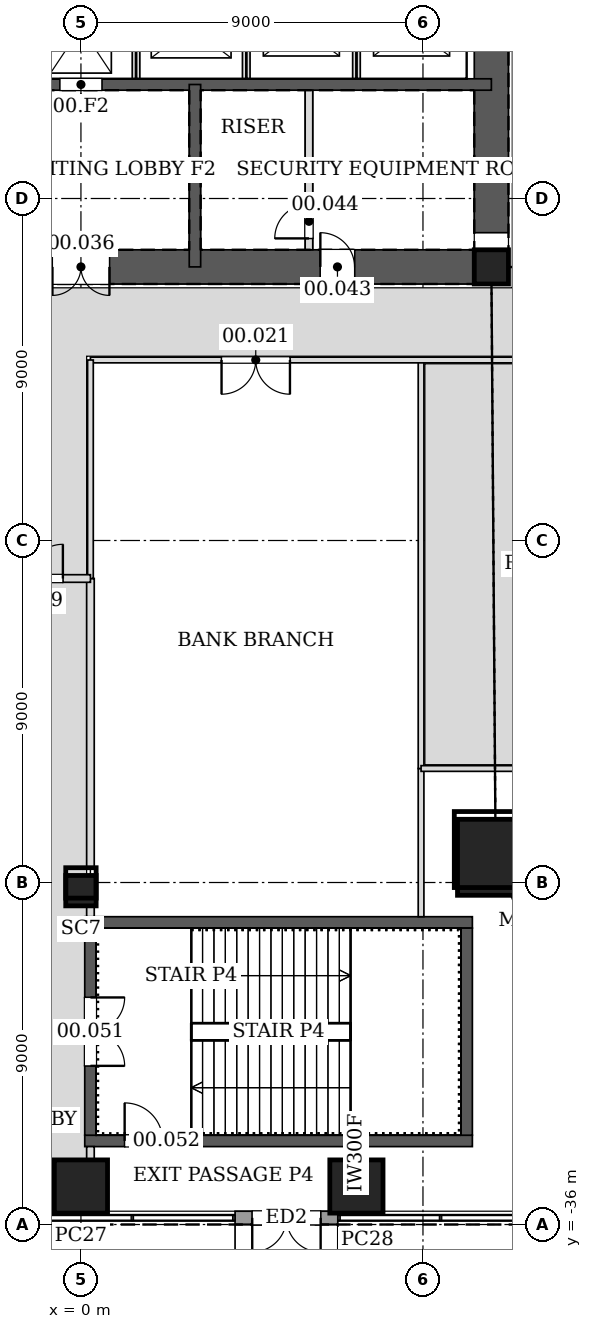
"""IFC4 building model, lengths in metres.
Left out: names, types, materials, properties, quantities, classifications, styles, units other than length and angle.
Written with IfcOpenShell. Run it as: python <this file> out.ifc"""

import sys

from ifc_helpers import new_model, si_unit, direction, frame, frame_2d, origin, origin_2d, place, context, subcontext, project, spatial, rectangle, hollow_rectangle, extrude, element, fill, save


model = new_model("IFC4")
c1 = context("Model", 3, precision=1e-05, world=origin(), true_north=direction((0.0, 1.0)))
c2 = subcontext(c1, "Body", "Model", "MODEL_VIEW")
j1 = project(units=[si_unit("LENGTHUNIT", "METRE"), si_unit("PLANEANGLEUNIT", "RADIAN")], contexts=[c1])
p1 = place(None, origin())
s1 = spatial("IfcSite", under=j1, at=p1, CompositionType="ELEMENT")
p2 = place(p1, origin())
s2 = spatial("IfcBuilding", under=s1, at=p2, CompositionType="ELEMENT")
p3 = place(p2, origin())
s3 = spatial("IfcBuildingStorey", under=s2, at=p3, CompositionType="ELEMENT", Elevation=0.0)
p4 = place(p3, frame((10.909, -26.336, 0.0), z_axis=(-0.011726897842, 0.028266568786, 0.999531630793), x_axis=(-0.923665637433, -0.383199413132, 0.0)))
e1 = element("IfcColumn", 1, at=p4, inside=s3, PredefinedType="COLUMN", context=c2, shape_type="SweptSolid", body=[
    extrude(hollow_rectangle(XDim=2.0, YDim=2.0, WallThickness=0.09, at=origin_2d()), origin(), (0.0, 0.0, 1.0), 7.203),
])
p5 = place(p3, frame((0.0, -27.215, 0.0), z_axis=(0.0, 0.028268512598, 0.999600365744), x_axis=(-1.0, 0.0, 0.0)))
e2 = element("IfcColumn", 2, at=p5, inside=s3, PredefinedType="COLUMN", context=c2, shape_type="SweptSolid", body=[
    extrude(hollow_rectangle(XDim=0.8, YDim=0.8, WallThickness=0.05, at=origin_2d()), origin(), (0.0, 0.0, 1.0), 7.203),
])
for number, where, z_axis, x_axis in (
    (3, (0.0, -35.0, 0.0), (0.0, 0.0, 1.0), (1.0, 0.0, 0.0)),
    (4, (7.249, -35.0, 0.0), (0.0, 0.0, 1.0), (1.0, 0.0, 0.0)),
):
    element("IfcColumn", number, at=place(p3, frame(where, z_axis=z_axis, x_axis=x_axis)), inside=s3, PredefinedType="COLUMN", context=c2, shape_type="SweptSolid", body=[
        extrude(rectangle(XDim=1.4, YDim=1.4, at=origin_2d()), origin(), (0.0, 0.0, 1.0), 7.2),
    ])
p6 = place(p3, frame((10.8, -10.8, 0.0), z_axis=(0.0, 0.0, 1.0), x_axis=(1.0, 0.0, 0.0)))
e5 = element("IfcColumn", 5, at=p6, inside=s3, PredefinedType="COLUMN", context=c2, shape_type="SweptSolid", body=[
    extrude(hollow_rectangle(XDim=0.9, YDim=0.9, WallThickness=0.06, at=origin_2d()), origin(), (0.0, 0.0, 1.0), 7.2),
])
p7 = place(p3, frame((-10.8, -10.8, 0.0), z_axis=(0.0, 0.0, 1.0), x_axis=(1.0, 0.0, 0.0)))
e6 = element("IfcWall", 6, at=p7, inside=s3, PredefinedType="SOLIDWALL", context=c2, shape_type="SweptSolid", body=[
    extrude(rectangle(XDim=21.6, YDim=0.9, at=frame_2d((10.8, 0.0))), origin(), (0.0, 0.0, 1.0), 7.2),
])
p8 = place(p7, frame((10.05, 0.0, 0.0)))
e7 = element("IfcOpeningElement", 7, at=p8, cuts=e6, PredefinedType="OPENING", context=c2, shape_type="SweptSolid", body=[
    extrude(rectangle(XDim=1.5, YDim=2.1, at=frame_2d((0.75, 1.05))), frame((0.0, 0.46, 0.0), z_axis=(0.0, -1.0, 0.0), x_axis=(1.0, 0.0, 0.0)), (0.0, 0.0, 1.0), 0.92),
])
p9 = place(p7, frame((6.3, 0.0, 0.0)))
e8 = element("IfcOpeningElement", 8, at=p9, cuts=e6, PredefinedType="OPENING", context=c2, shape_type="SweptSolid", body=[
    extrude(rectangle(XDim=1.2, YDim=2.1, at=frame_2d((0.6, 1.05))), frame((0.0, 0.46, 0.0), z_axis=(0.0, -1.0, 0.0), x_axis=(1.0, 0.0, 0.0)), (0.0, 0.0, 1.0), 0.92),
])
p10 = place(p7, frame((17.1, 0.0, 0.0)))
e9 = element("IfcOpeningElement", 9, at=p10, cuts=e6, PredefinedType="OPENING", context=c2, shape_type="SweptSolid", body=[
    extrude(rectangle(XDim=0.9, YDim=2.1, at=frame_2d((0.45, 1.05))), frame((0.0, 0.46, 0.0), z_axis=(0.0, -1.0, 0.0), x_axis=(1.0, 0.0, 0.0)), (0.0, 0.0, 1.0), 0.92),
])
p11 = place(p3, frame((10.8, -10.8, 0.0), z_axis=(0.0, 0.0, 1.0), x_axis=(0.0, 1.0, 0.0)))
e10 = element("IfcWall", 10, at=p11, inside=s3, PredefinedType="SOLIDWALL", context=c2, shape_type="SweptSolid", body=[
    extrude(rectangle(XDim=21.6, YDim=0.9, at=frame_2d((10.8, 0.0))), origin(), (0.0, 0.0, 1.0), 7.2),
])
p12 = place(p11, frame((11.7, 0.0, 0.0)))
e11 = element("IfcOpeningElement", 11, at=p12, cuts=e10, PredefinedType="OPENING", context=c2, shape_type="SweptSolid", body=[
    extrude(rectangle(XDim=1.2, YDim=2.1, at=frame_2d((0.6, 1.05))), frame((0.0, 0.46, 0.0), z_axis=(0.0, -1.0, 0.0), x_axis=(1.0, 0.0, 0.0)), (0.0, 0.0, 1.0), 0.92),
])
p13 = place(p11, frame((8.7, 0.0, 0.0)))
e12 = element("IfcOpeningElement", 12, at=p13, cuts=e10, PredefinedType="OPENING", context=c2, shape_type="SweptSolid", body=[
    extrude(rectangle(XDim=1.2, YDim=2.1, at=frame_2d((0.6, 1.05))), frame((0.0, 0.46, 0.0), z_axis=(0.0, -1.0, 0.0), x_axis=(1.0, 0.0, 0.0)), (0.0, 0.0, 1.0), 0.92),
])
p14 = place(p3, frame((-10.8, -6.0, 0.0), z_axis=(0.0, 0.0, 1.0), x_axis=(1.0, 0.0, 0.0)))
e13 = element("IfcWall", 13, at=p14, inside=s3, PredefinedType="SOLIDWALL", context=c2, shape_type="SweptSolid", body=[
    extrude(rectangle(XDim=21.6, YDim=0.3, at=frame_2d((10.8, 0.0))), origin(), (0.0, 0.0, 1.0), 7.2),
])
p15 = place(p14, frame((10.25, 0.0, 0.0)))
e14 = element("IfcOpeningElement", 14, at=p15, cuts=e13, PredefinedType="OPENING", context=c2, shape_type="SweptSolid", body=[
    extrude(rectangle(XDim=1.1, YDim=2.1, at=frame_2d((0.55, 1.05))), frame((0.0, 0.16, 0.0), z_axis=(0.0, -1.0, 0.0), x_axis=(1.0, 0.0, 0.0)), (0.0, 0.0, 1.0), 0.32),
])
p16 = place(p3, frame((3.0, -6.0, 0.0), z_axis=(0.0, 0.0, 1.0), x_axis=(0.0, -1.0, 0.0)))
e15 = element("IfcWall", 15, at=p16, inside=s3, PredefinedType="SOLIDWALL", context=c2, shape_type="SweptSolid", body=[
    extrude(rectangle(XDim=4.8, YDim=0.3, at=frame_2d((2.4, 0.0))), origin(), (0.0, 0.0, 1.0), 7.2),
])
p17 = place(p3, frame((0.1, -33.8, 0.0), z_axis=(0.0, 0.0, 1.0), x_axis=(1.0, 0.0, 0.0)))
e16 = element("IfcWall", 16, at=p17, inside=s3, PredefinedType="SOLIDWALL", context=c2, shape_type="SweptSolid", body=[
    extrude(rectangle(XDim=10.2, YDim=0.3, at=frame_2d((5.1, 0.0))), origin(), (0.0, 0.0, 1.0), 7.2),
])
p18 = place(p17, frame((1.05, 0.0, 0.0)))
e17 = element("IfcOpeningElement", 17, at=p18, cuts=e16, PredefinedType="OPENING", context=c2, shape_type="SweptSolid", body=[
    extrude(rectangle(XDim=1.0, YDim=2.1, at=frame_2d((0.5, 1.05))), frame((0.0, 0.16, 0.0), z_axis=(0.0, -1.0, 0.0), x_axis=(1.0, 0.0, 0.0)), (0.0, 0.0, 1.0), 0.32),
])
p19 = place(p3, frame((10.3, -28.05, 0.0), z_axis=(0.0, 0.0, 1.0), x_axis=(-1.0, 0.0, 0.0)))
e18 = element("IfcWall", 18, at=p19, inside=s3, PredefinedType="SOLIDWALL", context=c2, shape_type="SweptSolid", body=[
    extrude(rectangle(XDim=10.2, YDim=0.3, at=frame_2d((5.1, 0.0))), origin(), (0.0, 0.0, 1.0), 7.2),
])
p20 = place(p3, frame((0.25, -28.2, 0.0), z_axis=(0.0, 0.0, 1.0), x_axis=(0.0, -1.0, 0.0)))
e19 = element("IfcWall", 19, at=p20, inside=s3, PredefinedType="SOLIDWALL", context=c2, shape_type="SweptSolid", body=[
    extrude(rectangle(XDim=5.45, YDim=0.3, at=frame_2d((2.725, 0.0))), origin(), (0.0, 0.0, 1.0), 7.2),
])
p21 = place(p20, frame((1.825, 0.0, 0.0)))
e20 = element("IfcOpeningElement", 20, at=p21, cuts=e19, PredefinedType="OPENING", context=c2, shape_type="SweptSolid", body=[
    extrude(rectangle(XDim=1.8, YDim=2.1, at=frame_2d((0.9, 1.05))), frame((0.0, 0.16, 0.0), z_axis=(0.0, -1.0, 0.0), x_axis=(1.0, 0.0, 0.0)), (0.0, 0.0, 1.0), 0.32),
])
p22 = place(p3, frame((10.15, -33.65, 0.0), z_axis=(0.0, 0.0, 1.0), x_axis=(0.0, 1.0, 0.0)))
e21 = element("IfcWall", 21, at=p22, inside=s3, PredefinedType="SOLIDWALL", context=c2, shape_type="SweptSolid", body=[
    extrude(rectangle(XDim=5.45, YDim=0.3, at=frame_2d((2.725, 0.0))), origin(), (0.0, 0.0, 1.0), 7.2),
])
p23 = place(p3, frame((4.055, -35.825, 0.0), z_axis=(0.0, 0.0, 1.0), x_axis=(1.0, 0.0, 0.0)))
e22 = element("IfcWall", 22, at=p23, inside=s3, PredefinedType="SOLIDWALL", context=c2, shape_type="SweptSolid", body=[
    extrude(rectangle(XDim=2.704, YDim=0.35, at=frame_2d((1.352, 0.0))), origin(), (0.0, 0.0, 1.0), 6.9),
])
p24 = place(p23, frame((0.452, 0.0, 0.0)))
e23 = element("IfcOpeningElement", 23, at=p24, cuts=e22, PredefinedType="OPENING", context=c2, shape_type="SweptSolid", body=[
    extrude(rectangle(XDim=1.8, YDim=2.4, at=frame_2d((0.9, 1.2))), frame((0.0, 0.185, 0.0), z_axis=(0.0, -1.0, 0.0), x_axis=(1.0, 0.0, 0.0)), (0.0, 0.0, 1.0), 0.37),
])
p25 = place(p3, frame((7.249, -34.281, 0.0), z_axis=(0.0, 0.0, 1.0), x_axis=(0.0, 1.0, 0.0)))
e24 = element("IfcWall", 24, at=p25, inside=s3, PredefinedType="PARTITIONING", context=c2, shape_type="SweptSolid", body=[
    extrude(rectangle(XDim=0.332, YDim=0.3, at=frame_2d((0.166, 0.0))), origin(), (0.0, 0.0, 1.0), 6.291),
])
p26 = place(p3, frame((0.25, -33.949, 0.0), z_axis=(0.0, 0.0, 1.0), x_axis=(0.0, -1.0, 0.0)))
e25 = element("IfcWall", 25, at=p26, inside=s3, PredefinedType="PARTITIONING", context=c2, shape_type="SweptSolid", body=[
    extrude(rectangle(XDim=0.332, YDim=0.2, at=frame_2d((0.166, 0.0))), origin(), (0.0, 0.0, 1.0), 6.534),
])
p27 = place(p3, frame((8.95, -27.9, 0.0), z_axis=(0.0, 0.0, 1.0), x_axis=(0.0, 1.0, 0.0)))
e26 = element("IfcWall", 26, at=p27, inside=s3, PredefinedType="PARTITIONING", context=c2, shape_type="SweptSolid", body=[
    extrude(rectangle(XDim=3.901, YDim=0.15, at=frame_2d((1.951, 0.0))), origin(), (0.0, 0.0, 1.0), 5.879),
])
p28 = place(p3, frame((8.95, -24.001, 0.0), z_axis=(0.0, 0.0, 1.0), x_axis=(0.0, 1.0, 0.0)))
e27 = element("IfcWall", 27, at=p28, inside=s3, PredefinedType="PARTITIONING", context=c2, shape_type="SweptSolid", body=[
    extrude(rectangle(XDim=10.751, YDim=0.15, at=frame_2d((5.375, 0.0))), origin(), (0.0, 0.0, 1.0), 6.044),
])
p29 = place(p3, frame((0.25, -18.999, 0.0), z_axis=(0.0, 0.0, 1.0), x_axis=(0.0, -1.0, 0.0)))
e28 = element("IfcWall", 28, at=p29, inside=s3, PredefinedType="PARTITIONING", context=c2, shape_type="SweptSolid", body=[
    extrude(rectangle(XDim=7.593, YDim=0.2, at=frame_2d((3.796, 0.0))), origin(), (0.0, 0.0, 1.0), 5.59),
])
p30 = place(p3, frame((0.25, -27.634, 0.0), z_axis=(0.0, 0.0, 1.0), x_axis=(0.0, -1.0, 0.0)))
e29 = element("IfcWall", 29, at=p30, inside=s3, PredefinedType="PARTITIONING", context=c2, shape_type="SweptSolid", body=[
    extrude(rectangle(XDim=0.267, YDim=0.2, at=frame_2d((0.133, 0.0))), origin(), (0.0, 0.0, 1.0), 6.534),
])
p31 = place(p3, frame((0.25, -13.25, 0.0), z_axis=(0.0, 0.0, 1.0), x_axis=(1.0, 0.0, 0.0)))
e30 = element("IfcWall", 30, at=p31, inside=s3, PredefinedType="PARTITIONING", context=c2, shape_type="SweptSolid", body=[
    extrude(rectangle(XDim=14.25, YDim=0.15, at=frame_2d((7.125, 0.0))), origin(), (0.0, 0.0, 1.0), 5.59),
])
p32 = place(p31, frame((3.45, 0.0, 0.0)))
e31 = element("IfcOpeningElement", 31, at=p32, cuts=e30, PredefinedType="OPENING", context=c2, shape_type="SweptSolid", body=[
    extrude(rectangle(XDim=1.8, YDim=2.4, at=frame_2d((0.9, 1.2))), frame((0.0, 0.085, 0.0), z_axis=(0.0, -1.0, 0.0), x_axis=(1.0, 0.0, 0.0)), (0.0, 0.0, 1.0), 0.17),
])
p33 = place(p3, frame((0.25, -13.25, 0.0), z_axis=(0.0, 0.0, 1.0), x_axis=(0.0, -1.0, 0.0)))
e32 = element("IfcWall", 32, at=p33, inside=s3, PredefinedType="PARTITIONING", context=c2, shape_type="SweptSolid", body=[
    extrude(rectangle(XDim=5.751, YDim=0.15, at=frame_2d((2.875, 0.0))), origin(), (0.0, 0.0, 1.0), 5.59),
])
p34 = place(p3, frame((18.0, -24.0, 0.0), z_axis=(0.0, 0.0, 1.0), x_axis=(-1.0, 0.0, 0.0)))
e33 = element("IfcWall", 33, at=p34, inside=s3, PredefinedType="PARTITIONING", context=c2, shape_type="SweptSolid", body=[
    extrude(rectangle(XDim=9.05, YDim=0.15, at=frame_2d((4.525, 0.0))), origin(), (0.0, 0.0, 1.0), 5.59),
])
p35 = place(p3, frame((0.25, -19.0, 0.0), z_axis=(0.0, 0.0, 1.0), x_axis=(-1.0, 0.0, 0.0)))
e34 = element("IfcWall", 34, at=p35, inside=s3, PredefinedType="PARTITIONING", context=c2, shape_type="SweptSolid", body=[
    extrude(rectangle(XDim=3.25, YDim=0.2, at=frame_2d((1.625, 0.0))), origin(), (0.0, 0.0, 1.0), 5.59),
])
p36 = place(p35, frame((0.725, 0.0, 0.0)))
e35 = element("IfcOpeningElement", 35, at=p36, cuts=e34, PredefinedType="OPENING", context=c2, shape_type="SweptSolid", body=[
    extrude(rectangle(XDim=1.8, YDim=2.4, at=frame_2d((0.9, 1.2))), frame((0.0, 0.11, 0.0), z_axis=(0.0, -1.0, 0.0), x_axis=(1.0, 0.0, 0.0)), (0.0, 0.0, 1.0), 0.22),
])
for number, where, z_axis, x_axis in (
    (36, (1.45, -5.85, 0.0), (0.0, 0.0, 1.0), (0.0, 1.0, 0.0)),
    (37, (4.35, -5.85, 0.0), (0.0, 0.0, 1.0), (0.0, 1.0, 0.0)),
    (38, (7.25, -5.85, 0.0), (0.0, 0.0, 1.0), (0.0, 1.0, 0.0)),
):
    element("IfcWall", number, at=place(p3, frame(where, z_axis=z_axis, x_axis=x_axis)), inside=s3, PredefinedType="PARTITIONING", context=c2, shape_type="SweptSolid", body=[
        extrude(rectangle(XDim=2.7, YDim=0.2, at=frame_2d((1.35, 0.0))), origin(), (0.0, 0.0, 1.0), 7.2),
    ])
p37 = place(p3, frame((6.0, -10.35, 0.0), z_axis=(0.0, 0.0, 1.0), x_axis=(0.0, 1.0, 0.0)))
e39 = element("IfcWall", 39, at=p37, inside=s3, PredefinedType="PARTITIONING", context=c2, shape_type="SweptSolid", body=[
    extrude(rectangle(XDim=4.2, YDim=0.2, at=frame_2d((2.1, 0.0))), origin(), (0.0, 0.0, 1.0), 6.9),
])
p38 = place(p37, frame((0.3, 0.0, 0.0)))
e40 = element("IfcOpeningElement", 40, at=p38, cuts=e39, PredefinedType="OPENING", context=c2, shape_type="SweptSolid", body=[
    extrude(rectangle(XDim=0.9, YDim=2.1, at=frame_2d((0.45, 1.05))), frame((0.0, 0.11, 0.0), z_axis=(0.0, -1.0, 0.0), x_axis=(1.0, 0.0, 0.0)), (0.0, 0.0, 1.0), 0.22),
])
p39 = place(p24, frame((1.8, 0.0, 0.0), z_axis=(0.0, 0.0, 1.0), x_axis=(-1.0, 0.0, 0.0)))
e41 = element("IfcDoor", 41, at=p39, inside=s3, OperationType="DOUBLE_DOOR_SINGLE_SWING", PredefinedType="DOOR", context=c2, shape_type="SweptSolid", body=[
    extrude(rectangle(XDim=1.8, YDim=2.4, at=frame_2d((0.9, 1.2))), frame((0.0, 0.025, 0.0), z_axis=(0.0, -1.0, 0.0), x_axis=(1.0, 0.0, 0.0)), (0.0, 0.0, 1.0), 0.05),
])
fill(e23, e41)
p40 = place(p32, frame((1.8, 0.0, 0.0), z_axis=(0.0, 0.0, 1.0), x_axis=(-1.0, 0.0, 0.0)))
e42 = element("IfcDoor", 42, at=p40, inside=s3, OperationType="DOUBLE_DOOR_SINGLE_SWING", PredefinedType="DOOR", context=c2, shape_type="SweptSolid", body=[
    extrude(rectangle(XDim=1.8, YDim=2.4, at=frame_2d((0.9, 1.2))), frame((0.0, 0.025, 0.0), z_axis=(0.0, -1.0, 0.0), x_axis=(1.0, 0.0, 0.0)), (0.0, 0.0, 1.0), 0.05),
])
fill(e31, e42)
p41 = place(p36, frame((1.8, 0.0, 0.0), z_axis=(0.0, 0.0, 1.0), x_axis=(-1.0, 0.0, 0.0)))
e43 = element("IfcDoor", 43, at=p41, inside=s3, OperationType="DOUBLE_DOOR_SINGLE_SWING", PredefinedType="DOOR", context=c2, shape_type="SweptSolid", body=[
    extrude(rectangle(XDim=1.8, YDim=2.4, at=frame_2d((0.9, 1.2))), frame((0.0, 0.025, 0.0), z_axis=(0.0, -1.0, 0.0), x_axis=(1.0, 0.0, 0.0)), (0.0, 0.0, 1.0), 0.05),
])
fill(e35, e43)
p42 = place(p8, frame((1.5, 0.0, 0.0), z_axis=(0.0, 0.0, 1.0), x_axis=(-1.0, 0.0, 0.0)))
e44 = element("IfcDoor", 44, at=p42, inside=s3, OperationType="DOUBLE_DOOR_SINGLE_SWING", PredefinedType="DOOR", context=c2, shape_type="SweptSolid", body=[
    extrude(rectangle(XDim=1.5, YDim=2.1, at=frame_2d((0.75, 1.05))), frame((0.0, 0.025, 0.0), z_axis=(0.0, -1.0, 0.0), x_axis=(1.0, 0.0, 0.0)), (0.0, 0.0, 1.0), 0.05),
])
fill(e7, e44)
p43 = place(p10, origin())
e45 = element("IfcDoor", 45, at=p43, inside=s3, OperationType="SINGLE_SWING_LEFT", PredefinedType="DOOR", context=c2, shape_type="SweptSolid", body=[
    extrude(rectangle(XDim=0.9, YDim=2.1, at=frame_2d((0.45, 1.05))), frame((0.0, 0.025, 0.0), z_axis=(0.0, -1.0, 0.0), x_axis=(1.0, 0.0, 0.0)), (0.0, 0.0, 1.0), 0.05),
])
fill(e9, e45)
p44 = place(p38, origin())
e46 = element("IfcDoor", 46, at=p44, inside=s3, OperationType="SINGLE_SWING_LEFT", PredefinedType="DOOR", context=c2, shape_type="SweptSolid", body=[
    extrude(rectangle(XDim=0.9, YDim=2.1, at=frame_2d((0.45, 1.05))), frame((0.0, 0.025, 0.0), z_axis=(0.0, -1.0, 0.0), x_axis=(1.0, 0.0, 0.0)), (0.0, 0.0, 1.0), 0.05),
])
fill(e40, e46)
p45 = place(p21, origin())
e47 = element("IfcDoor", 47, at=p45, inside=s3, OperationType="DOUBLE_DOOR_SINGLE_SWING", PredefinedType="DOOR", context=c2, shape_type="SweptSolid", body=[
    extrude(rectangle(XDim=1.8, YDim=2.1, at=frame_2d((0.9, 1.05))), frame((0.0, 0.025, 0.0), z_axis=(0.0, -1.0, 0.0), x_axis=(1.0, 0.0, 0.0)), (0.0, 0.0, 1.0), 0.05),
])
fill(e20, e47)
p46 = place(p18, origin())
e48 = element("IfcDoor", 48, at=p46, inside=s3, OperationType="SINGLE_SWING_LEFT", PredefinedType="DOOR", context=c2, shape_type="SweptSolid", body=[
    extrude(rectangle(XDim=1.0, YDim=2.1, at=frame_2d((0.5, 1.05))), frame((0.0, 0.025, 0.0), z_axis=(0.0, -1.0, 0.0), x_axis=(1.0, 0.0, 0.0)), (0.0, 0.0, 1.0), 0.05),
])
fill(e17, e48)
p47 = place(p15, origin())
e49 = element("IfcDoor", 49, at=p47, inside=s3, OperationType="DOUBLE_DOOR_SLIDING", PredefinedType="DOOR", context=c2, shape_type="SweptSolid", body=[
    extrude(rectangle(XDim=1.1, YDim=2.1, at=frame_2d((0.55, 1.05))), frame((0.0, 0.025, 0.0), z_axis=(0.0, -1.0, 0.0), x_axis=(1.0, 0.0, 0.0)), (0.0, 0.0, 1.0), 0.05),
])
fill(e14, e49)
save(model, sys.argv[1])
